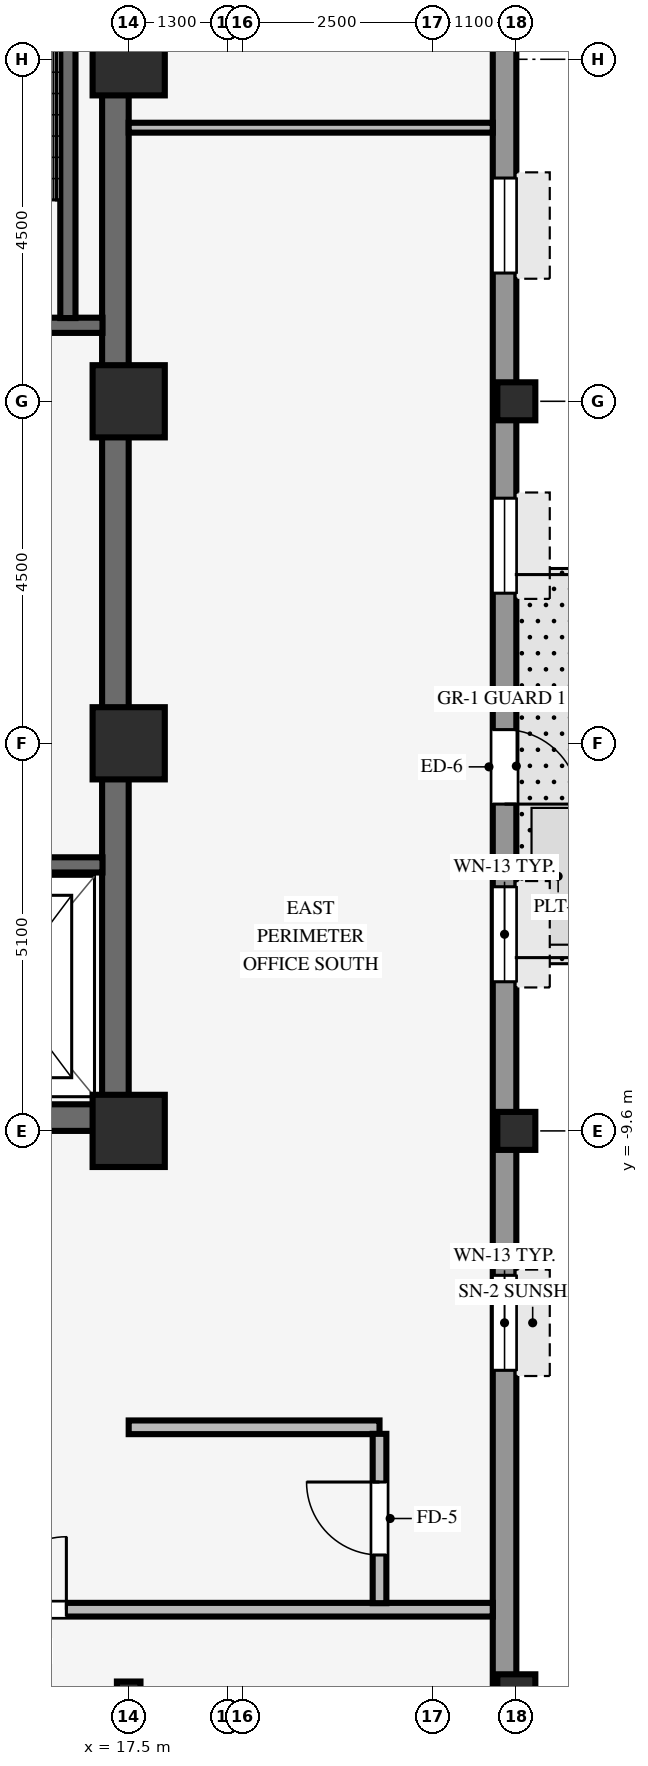
"""IFC4 building model, lengths in metres.
Left out: names, types, materials, properties, quantities, classifications, styles, units other than length and angle.
Written with IfcOpenShell. Run it as: python <this file> out.ifc"""

import sys

from ifc_helpers import new_model, si_unit, direction, frame, frame_2d, origin, origin_2d, place, context, subcontext, project, spatial, rectangle, hollow_rectangle, i_section, extrude, source, transform, mapped, element, fill, save


model = new_model("IFC4")
c1 = context("Model", 3, precision=1e-05, world=origin(), true_north=direction((0.0, 1.0)))
c2 = subcontext(c1, "Body", "Model", "MODEL_VIEW")
j1 = project(units=[si_unit("LENGTHUNIT", "METRE"), si_unit("PLANEANGLEUNIT", "RADIAN")], contexts=[c1])
p1 = place(None, origin())
s1 = spatial("IfcSite", under=j1, at=p1, CompositionType="ELEMENT")
p2 = place(p1, origin())
s2 = spatial("IfcBuilding", under=s1, at=p2, CompositionType="ELEMENT")
p3 = place(p2, frame((0.0, 0.0, 194.55)))
s3 = spatial("IfcBuildingStorey", under=s2, at=p3, CompositionType="ELEMENT", Elevation=194.55)
p4 = place(p3, frame((9.0, -9.425, 0.0), z_axis=(0.0, 0.0, 1.0), x_axis=(1.0, 0.0, 0.0)))
e1 = element("IfcWall", 1, at=p4, inside=s3, PredefinedType="SHEAR", context=c2, shape_type="SweptSolid", body=[
    extrude(rectangle(XDim=8.5, YDim=0.35, at=frame_2d((4.25, 0.0))), origin(), (0.0, 0.0, 1.0), 3.37),
])
p5 = place(p3, frame((17.325, -9.255, 0.0), z_axis=(0.0, 0.0, 1.0), x_axis=(0.0, 1.0, 0.0)))
e2 = element("IfcWall", 2, at=p5, inside=s3, PredefinedType="SHEAR", context=c2, shape_type="SweptSolid", body=[
    extrude(rectangle(XDim=18.51, YDim=0.35, at=frame_2d((9.255, 0.0))), origin(), (0.0, 0.0, 1.0), 3.37),
])
for number, where, z_axis, x_axis in (
    (3, (17.5, -9.6, 0.0), (0.0, 0.0, 1.0), (1.0, 0.0, 0.0)),
    (4, (17.5, -4.5, 0.0), (0.0, 0.0, 1.0), (1.0, 0.0, 0.0)),
    (5, (17.5, 4.5, 0.0), (0.0, 0.0, 1.0), (1.0, 0.0, 0.0)),
    (6, (17.5, 0.0, 0.0), (0.0, 0.0, 1.0), (1.0, 0.0, 0.0)),
):
    element("IfcColumn", number, at=place(p3, frame(where, z_axis=z_axis, x_axis=x_axis)), inside=s3, PredefinedType="COLUMN", context=c2, shape_type="SweptSolid", body=[
        extrude(rectangle(XDim=0.95, YDim=0.95, at=origin_2d()), origin(), (0.0, 0.0, 1.0), 3.37),
    ])
for number, where, z_axis, x_axis in (
    (7, (22.6, -17.0, 0.0), (0.0, 0.0, 1.0), (1.0, 0.0, 0.0)),
    (8, (22.6, -9.6, 0.0), (0.0, 0.0, 1.0), (1.0, 0.0, 0.0)),
    (9, (22.6, 0.0, 0.0), (0.0, 0.0, 1.0), (1.0, 0.0, 0.0)),
):
    element("IfcColumn", number, at=place(p3, frame(where, z_axis=z_axis, x_axis=x_axis)), inside=s3, PredefinedType="COLUMN", context=c2, shape_type="SweptSolid", body=[
        extrude(hollow_rectangle(XDim=0.5, YDim=0.5, WallThickness=0.032, InnerFilletRadius=0.032, OuterFilletRadius=0.064, at=origin_2d()), origin(), (0.0, 0.0, 1.0), 3.37),
    ])
p6 = place(p3, frame((17.5, -17.0, 0.0), z_axis=(0.0, 0.0, 1.0), x_axis=(1.0, 0.0, 0.0)))
e10 = element("IfcColumn", 10, at=p6, inside=s3, PredefinedType="COLUMN", context=c2, shape_type="SweptSolid", body=[
    extrude(i_section(OverallWidth=0.31, OverallDepth=0.31, WebThickness=0.015, FlangeThickness=0.015, FilletRadius=0.015, at=origin_2d()), origin(), (0.0, 0.0, 1.0), 3.37),
])
p7 = place(p3, frame((22.445, -20.794, 0.0), z_axis=(0.0, 0.0, 1.0), x_axis=(0.0, 1.0, 0.0)))
e11 = element("IfcWall", 11, at=p7, inside=s3, PredefinedType="STANDARD", context=c2, shape_type="SweptSolid", body=[
    extrude(rectangle(XDim=37.788, YDim=0.31, at=frame_2d((18.894, 0.0))), origin(), (0.0, 0.0, 1.0), 2.705),
])
p8 = place(p7, frame((16.474, 0.0, 0.0), z_axis=(0.0, 0.0, 1.0), x_axis=(-1.0, 0.0, 0.0)))
e12 = element("IfcOpeningElement", 12, at=p8, cuts=e11, PredefinedType="OPENING", context=c2, shape_type="SweptSolid", body=[
    extrude(rectangle(XDim=0.98, YDim=2.15, at=frame_2d((0.49, 1.075))), frame((0.0, 0.165, 0.0), z_axis=(0.0, -1.0, 0.0), x_axis=(1.0, 0.0, 0.0)), (0.0, 0.0, 1.0), 0.33),
])
p9 = place(p7, frame((1.581, 0.0, 0.8)))
e13 = element("IfcOpeningElement", 13, at=p9, cuts=e11, PredefinedType="OPENING", context=c2, shape_type="SweptSolid", body=[
    extrude(rectangle(XDim=1.25, YDim=1.52, at=frame_2d((0.625, 0.76))), frame((0.0, 0.165, 0.0), z_axis=(0.0, -1.0, 0.0), x_axis=(1.0, 0.0, 0.0)), (0.0, 0.0, 1.0), 0.33),
])
p10 = place(p7, frame((8.044, 0.0, 0.8)))
e14 = element("IfcOpeningElement", 14, at=p10, cuts=e11, PredefinedType="OPENING", context=c2, shape_type="SweptSolid", body=[
    extrude(rectangle(XDim=1.25, YDim=1.52, at=frame_2d((0.625, 0.76))), frame((0.0, 0.165, 0.0), z_axis=(0.0, -1.0, 0.0), x_axis=(1.0, 0.0, 0.0)), (0.0, 0.0, 1.0), 0.33),
])
p11 = place(p7, frame((13.156, 0.0, 0.8)))
e15 = element("IfcOpeningElement", 15, at=p11, cuts=e11, PredefinedType="OPENING", context=c2, shape_type="SweptSolid", body=[
    extrude(rectangle(XDim=1.25, YDim=1.52, at=frame_2d((0.625, 0.76))), frame((0.0, 0.165, 0.0), z_axis=(0.0, -1.0, 0.0), x_axis=(1.0, 0.0, 0.0)), (0.0, 0.0, 1.0), 0.33),
])
p12 = place(p7, frame((18.269, 0.0, 0.8)))
e16 = element("IfcOpeningElement", 16, at=p12, cuts=e11, PredefinedType="OPENING", context=c2, shape_type="SweptSolid", body=[
    extrude(rectangle(XDim=1.25, YDim=1.52, at=frame_2d((0.625, 0.76))), frame((0.0, 0.165, 0.0), z_axis=(0.0, -1.0, 0.0), x_axis=(1.0, 0.0, 0.0)), (0.0, 0.0, 1.0), 0.33),
])
p13 = place(p7, frame((22.482, 0.0, 0.8)))
e17 = element("IfcOpeningElement", 17, at=p13, cuts=e11, PredefinedType="OPENING", context=c2, shape_type="SweptSolid", body=[
    extrude(rectangle(XDim=1.25, YDim=1.52, at=frame_2d((0.625, 0.76))), frame((0.0, 0.165, 0.0), z_axis=(0.0, -1.0, 0.0), x_axis=(1.0, 0.0, 0.0)), (0.0, 0.0, 1.0), 0.33),
])
p14 = place(p7, frame((28.044, 0.0, 0.8)))
e18 = element("IfcOpeningElement", 18, at=p14, cuts=e11, PredefinedType="OPENING", context=c2, shape_type="SweptSolid", body=[
    extrude(rectangle(XDim=1.25, YDim=1.52, at=frame_2d((0.625, 0.76))), frame((0.0, 0.165, 0.0), z_axis=(0.0, -1.0, 0.0), x_axis=(1.0, 0.0, 0.0)), (0.0, 0.0, 1.0), 0.33),
])
p15 = place(p7, frame((33.607, 0.0, 0.8)))
e19 = element("IfcOpeningElement", 19, at=p15, cuts=e11, PredefinedType="OPENING", context=c2, shape_type="SweptSolid", body=[
    extrude(rectangle(XDim=1.25, YDim=1.52, at=frame_2d((0.625, 0.76))), frame((0.0, 0.165, 0.0), z_axis=(0.0, -1.0, 0.0), x_axis=(1.0, 0.0, 0.0)), (0.0, 0.0, 1.0), 0.33),
])
p16 = place(p3, frame((13.535, 1.0, 0.0), z_axis=(0.0, 0.0, 1.0), x_axis=(1.0, 0.0, 0.0)))
e20 = element("IfcWall", 20, at=p16, inside=s3, PredefinedType="SHEAR", context=c2, shape_type="SweptSolid", body=[
    extrude(rectangle(XDim=3.62, YDim=0.2, at=frame_2d((1.81, 0.0))), origin(), (0.0, 0.0, 1.0), 3.37),
])
p17 = place(p3, frame((16.7, 1.095, 0.0), z_axis=(0.0, 0.0, 1.0), x_axis=(0.0, 1.0, 0.0)))
e21 = element("IfcWall", 21, at=p17, inside=s3, PredefinedType="SHEAR", context=c2, shape_type="SweptSolid", body=[
    extrude(rectangle(XDim=8.16, YDim=0.2, at=frame_2d((4.08, 0.0))), origin(), (0.0, 0.0, 1.0), 3.37),
])
p18 = place(p3, frame((14.645, -6.1, 0.0), z_axis=(0.0, 0.0, 1.0), x_axis=(1.0, 0.0, 0.0)))
e22 = element("IfcWall", 22, at=p18, inside=s3, PredefinedType="SHEAR", context=c2, shape_type="SweptSolid", body=[
    extrude(rectangle(XDim=2.51, YDim=0.2, at=frame_2d((1.255, 0.0))), origin(), (0.0, 0.0, 1.0), 3.37),
])
p19 = place(p3, frame((-26.09, -15.9, 0.0), z_axis=(0.0, 0.0, 1.0), x_axis=(1.0, 0.0, 0.0)))
e23 = element("IfcWall", 23, at=p19, inside=s3, PredefinedType="PARTITIONING", context=c2, shape_type="SweptSolid", body=[
    extrude(rectangle(XDim=48.38, YDim=0.18, at=frame_2d((24.19, 0.0))), origin(), (0.0, 0.0, 1.0), 3.36),
])
p20 = place(p19, frame((41.81, 0.0, 0.0)))
e24 = element("IfcOpeningElement", 24, at=p20, cuts=e23, PredefinedType="OPENING", context=c2, shape_type="SweptSolid", body=[
    extrude(rectangle(XDim=0.96, YDim=2.1, at=frame_2d((0.48, 1.05))), frame((0.0, 0.1, 0.0), z_axis=(0.0, -1.0, 0.0), x_axis=(1.0, 0.0, 0.0)), (0.0, 0.0, 1.0), 0.2),
])
p21 = place(p19, frame((17.985, 0.0, 0.0)))
e25 = element("IfcOpeningElement", 25, at=p21, cuts=e23, PredefinedType="OPENING", context=c2, shape_type="SweptSolid", body=[
    extrude(rectangle(XDim=0.96, YDim=2.1, at=frame_2d((0.48, 1.05))), frame((0.0, 0.1, 0.0), z_axis=(0.0, -1.0, 0.0), x_axis=(1.0, 0.0, 0.0)), (0.0, 0.0, 1.0), 0.2),
])
p22 = place(p19, frame((26.55, 0.0, 0.0)))
e26 = element("IfcOpeningElement", 26, at=p22, cuts=e23, PredefinedType="OPENING", context=c2, shape_type="SweptSolid", body=[
    extrude(rectangle(XDim=0.96, YDim=2.1, at=frame_2d((0.48, 1.05))), frame((0.0, 0.1, 0.0), z_axis=(0.0, -1.0, 0.0), x_axis=(1.0, 0.0, 0.0)), (0.0, 0.0, 1.0), 0.2),
])
p23 = place(p19, frame((10.935, 0.0, 0.0)))
e27 = element("IfcOpeningElement", 27, at=p23, cuts=e23, PredefinedType="OPENING", context=c2, shape_type="SweptSolid", body=[
    extrude(rectangle(XDim=0.96, YDim=2.1, at=frame_2d((0.48, 1.05))), frame((0.0, 0.1, 0.0), z_axis=(0.0, -1.0, 0.0), x_axis=(1.0, 0.0, 0.0)), (0.0, 0.0, 1.0), 0.2),
])
p24 = place(p19, frame((35.91, 0.0, 0.0)))
e28 = element("IfcOpeningElement", 28, at=p24, cuts=e23, PredefinedType="OPENING", context=c2, shape_type="SweptSolid", body=[
    extrude(rectangle(XDim=0.96, YDim=2.1, at=frame_2d((0.48, 1.05))), frame((0.0, 0.1, 0.0), z_axis=(0.0, -1.0, 0.0), x_axis=(1.0, 0.0, 0.0)), (0.0, 0.0, 1.0), 0.2),
])
p25 = place(p19, frame((2.465, 0.0, 0.0)))
e29 = element("IfcOpeningElement", 29, at=p25, cuts=e23, PredefinedType="OPENING", context=c2, shape_type="SweptSolid", body=[
    extrude(rectangle(XDim=0.96, YDim=2.1, at=frame_2d((0.48, 1.05))), frame((0.0, 0.1, 0.0), z_axis=(0.0, -1.0, 0.0), x_axis=(1.0, 0.0, 0.0)), (0.0, 0.0, 1.0), 0.2),
])
p26 = place(p3, frame((17.5, -13.5, 0.0), z_axis=(0.0, 0.0, 1.0), x_axis=(1.0, 0.0, 0.0)))
e30 = element("IfcWall", 30, at=p26, inside=s3, PredefinedType="PARTITIONING", context=c2, shape_type="SweptSolid", body=[
    extrude(rectangle(XDim=3.3, YDim=0.18, at=frame_2d((1.65, 0.0))), origin(), (0.0, 0.0, 1.0), 3.008),
])
p27 = place(p3, frame((17.5, 3.6, 0.0), z_axis=(0.0, 0.0, 1.0), x_axis=(1.0, 0.0, 0.0)))
e31 = element("IfcWall", 31, at=p27, inside=s3, PredefinedType="PARTITIONING", context=c2, shape_type="SweptSolid", body=[
    extrude(rectangle(XDim=4.79, YDim=0.13, at=frame_2d((2.395, 0.0))), origin(), (0.0, 0.0, 1.0), 3.36),
])
p28 = place(p3, frame((20.8, -15.814, 0.0), z_axis=(0.0, 0.0, 1.0), x_axis=(0.0, 1.0, 0.0)))
e32 = element("IfcWall", 32, at=p28, inside=s3, PredefinedType="PARTITIONING", context=c2, shape_type="SweptSolid", body=[
    extrude(rectangle(XDim=2.228, YDim=0.18, at=frame_2d((1.114, 0.0))), origin(), (0.0, 0.0, 1.0), 3.36),
])
p29 = place(p28, frame((0.634, 0.0, 0.0)))
e33 = element("IfcOpeningElement", 33, at=p29, cuts=e32, PredefinedType="OPENING", context=c2, shape_type="SweptSolid", body=[
    extrude(rectangle(XDim=0.96, YDim=2.1, at=frame_2d((0.48, 1.05))), frame((0.0, 0.1, 0.0), z_axis=(0.0, -1.0, 0.0), x_axis=(1.0, 0.0, 0.0)), (0.0, 0.0, 1.0), 0.2),
])
m1 = source(origin(), c2, "Body", "SweptSolid", [
    extrude(rectangle(XDim=0.98, YDim=2.15, at=frame_2d((0.49, 1.075))), frame((0.0, 0.025, 0.0), z_axis=(0.0, -1.0, 0.0), x_axis=(1.0, 0.0, 0.0)), (0.0, 0.0, 1.0), 0.05),
])
p30 = place(p8, origin())
e34 = element("IfcDoor", 34, at=p30, inside=s3, OperationType="SINGLE_SWING_RIGHT", PredefinedType="DOOR", context=c2, shape_type="MappedRepresentation", body=[
    mapped(m1, transform((0.0, 0.0, 0.0), scale=1.0)),
])
fill(e12, e34)
m2 = source(origin(), c2, "Body", "SweptSolid", [
    extrude(rectangle(XDim=1.25, YDim=1.52, at=frame_2d((0.625, 0.76))), frame((0.0, 0.03, 0.0), z_axis=(0.0, -1.0, 0.0), x_axis=(1.0, 0.0, 0.0)), (0.0, 0.0, 1.0), 0.06),
])
p31 = place(p10, origin())
e35 = element("IfcWindow", 35, at=p31, inside=s3, PartitioningType="SINGLE_PANEL", PredefinedType="WINDOW", context=c2, shape_type="MappedRepresentation", body=[
    mapped(m2, transform((0.0, 0.0, 0.0), scale=1.0)),
])
fill(e14, e35)
p32 = place(p11, origin())
e36 = element("IfcWindow", 36, at=p32, inside=s3, PartitioningType="SINGLE_PANEL", PredefinedType="WINDOW", context=c2, shape_type="MappedRepresentation", body=[
    mapped(m2, transform((0.0, 0.0, 0.0), scale=1.0)),
])
fill(e15, e36)
p33 = place(p12, origin())
e37 = element("IfcWindow", 37, at=p33, inside=s3, PartitioningType="SINGLE_PANEL", PredefinedType="WINDOW", context=c2, shape_type="MappedRepresentation", body=[
    mapped(m2, transform((0.0, 0.0, 0.0), scale=1.0)),
])
fill(e16, e37)
p34 = place(p13, origin())
e38 = element("IfcWindow", 38, at=p34, inside=s3, PartitioningType="SINGLE_PANEL", PredefinedType="WINDOW", context=c2, shape_type="MappedRepresentation", body=[
    mapped(m2, transform((0.0, 0.0, 0.0), scale=1.0)),
])
fill(e17, e38)
m3 = source(origin(), c2, "Body", "SweptSolid", [
    extrude(rectangle(XDim=0.96, YDim=2.1, at=frame_2d((0.48, 1.05))), frame((0.0, 0.025, 0.0), z_axis=(0.0, -1.0, 0.0), x_axis=(1.0, 0.0, 0.0)), (0.0, 0.0, 1.0), 0.05),
])
p35 = place(p20, origin())
e39 = element("IfcDoor", 39, at=p35, inside=s3, OperationType="SINGLE_SWING_RIGHT", PredefinedType="DOOR", context=c2, shape_type="MappedRepresentation", body=[
    mapped(m3, transform((0.0, 0.0, 0.0), scale=1.0)),
])
fill(e24, e39)
p36 = place(p29, origin())
e40 = element("IfcDoor", 40, at=p36, inside=s3, OperationType="SINGLE_SWING_RIGHT", PredefinedType="DOOR", context=c2, shape_type="MappedRepresentation", body=[
    mapped(m3, transform((0.0, 0.0, 0.0), scale=1.0)),
])
fill(e33, e40)
save(model, sys.argv[1])
